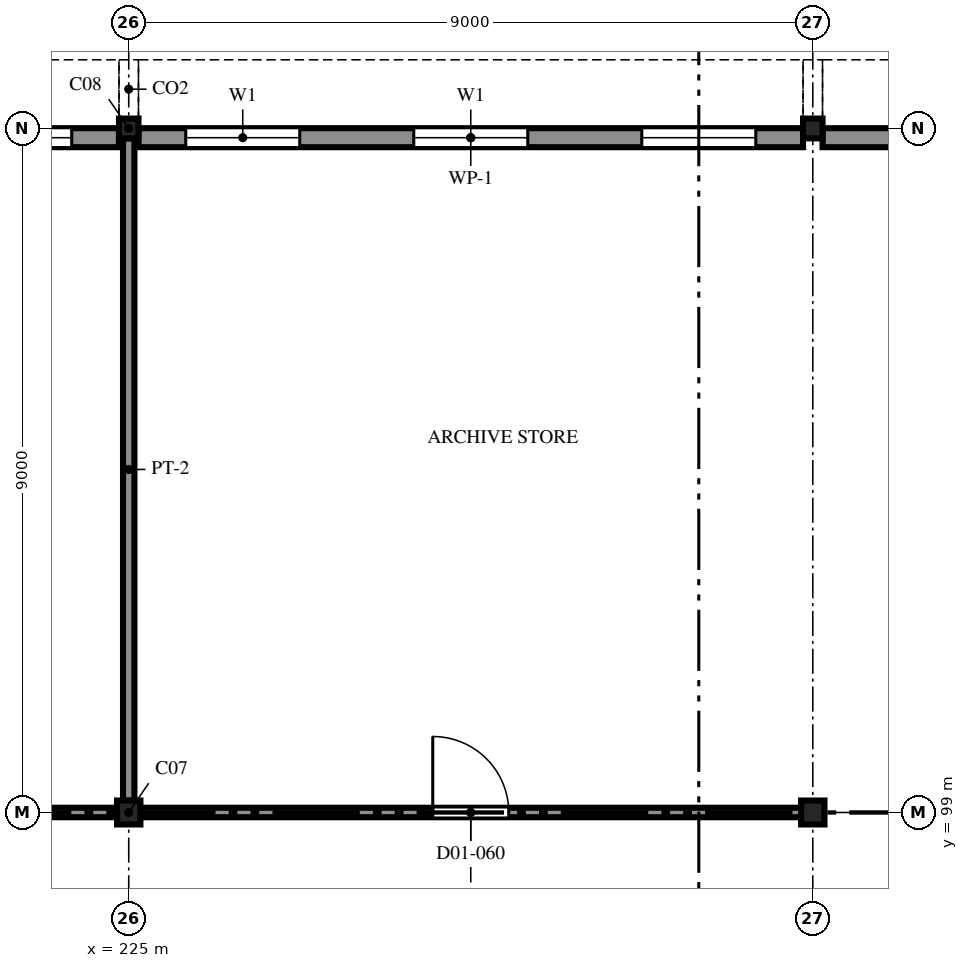
"""IFC4 building model, lengths in metres.
Left out: names, types, materials, properties, quantities, classifications, styles, units other than length and angle.
Written with IfcOpenShell. Run it as: python <this file> out.ifc"""

import sys

from ifc_helpers import new_model, si_unit, direction, frame, frame_2d, origin, origin_2d, place, context, subcontext, project, spatial, polyline, rectangle, i_section, outline, extrude, element, fill, save


model = new_model("IFC4")
c1 = context("Model", 3, precision=1e-05, world=origin(), true_north=direction((0.0, 1.0)))
c2 = subcontext(c1, "Body", "Model", "MODEL_VIEW")
j1 = project(units=[si_unit("LENGTHUNIT", "METRE"), si_unit("PLANEANGLEUNIT", "RADIAN")], contexts=[c1])
p1 = place(None, origin())
s1 = spatial("IfcSite", under=j1, at=p1, CompositionType="ELEMENT")
p2 = place(p1, origin())
s2 = spatial("IfcBuilding", under=s1, at=p2, CompositionType="ELEMENT")
p3 = place(p2, frame((0.0, 0.0, 7.5)))
s3 = spatial("IfcBuildingStorey", under=s2, at=p3, CompositionType="ELEMENT", Elevation=7.5)
p4 = place(p3, frame((225.0, 99.0, 0.0), z_axis=(0.0, 0.0, 1.0), x_axis=(1.0, 0.0, 0.0)))
e1 = element("IfcColumn", 1, at=p4, inside=s3, PredefinedType="COLUMN", context=c2, shape_type="SweptSolid", body=[
    extrude(i_section(OverallWidth=0.307, OverallDepth=0.314, WebThickness=0.012, FlangeThickness=0.019, FilletRadius=0.015, at=origin_2d()), origin(), (0.0, 0.0, 1.0), 4.2),
])
p5 = place(p3, frame((225.0, 108.0, 0.0), z_axis=(0.0, 0.0, 1.0), x_axis=(1.0, 0.0, 0.0)))
e2 = element("IfcColumn", 2, at=p5, inside=s3, PredefinedType="COLUMN", context=c2, shape_type="SweptSolid", body=[
    extrude(i_section(OverallWidth=0.256, OverallDepth=0.26, WebThickness=0.01, FlangeThickness=0.017, FilletRadius=0.013, at=origin_2d()), origin(), (0.0, 0.0, 1.0), 4.2),
])
p6 = place(p3, frame((234.0, 99.0, 0.0), z_axis=(0.0, 0.0, 1.0), x_axis=(1.0, 0.0, 0.0)))
e3 = element("IfcColumn", 3, at=p6, inside=s3, PredefinedType="COLUMN", context=c2, shape_type="SweptSolid", body=[
    extrude(i_section(OverallWidth=0.307, OverallDepth=0.314, WebThickness=0.012, FlangeThickness=0.019, FilletRadius=0.015, at=origin_2d()), origin(), (0.0, 0.0, 1.0), 4.2),
])
p7 = place(p3, frame((234.0, 108.0, 0.0), z_axis=(0.0, 0.0, 1.0), x_axis=(1.0, 0.0, 0.0)))
e4 = element("IfcColumn", 4, at=p7, inside=s3, PredefinedType="COLUMN", context=c2, shape_type="SweptSolid", body=[
    extrude(i_section(OverallWidth=0.256, OverallDepth=0.26, WebThickness=0.01, FlangeThickness=0.017, FilletRadius=0.013, at=origin_2d()), origin(), (0.0, 0.0, 1.0), 4.2),
])
p8 = place(p3, frame((216.128, 107.878, 0.0), z_axis=(0.0, 0.0, 1.0), x_axis=(1.0, 0.0, 0.0)))
e5 = element("IfcWall", 5, at=p8, inside=s3, PredefinedType="SOLIDWALL", context=c2, shape_type="SweptSolid", body=[
    extrude(rectangle(XDim=8.744, YDim=0.25, at=frame_2d((4.372, 0.0))), origin(), (0.0, 0.0, 1.0), 4.05),
])
p9 = place(p8, frame((0.622, 0.0, 0.9)))
e6 = element("IfcOpeningElement", 6, at=p9, cuts=e5, PredefinedType="OPENING", context=c2, shape_type="SweptSolid", body=[
    extrude(rectangle(XDim=1.5, YDim=2.4, at=frame_2d((0.75, 1.2))), frame((0.0, 0.135, 0.0), z_axis=(0.0, -1.0, 0.0), x_axis=(1.0, 0.0, 0.0)), (0.0, 0.0, 1.0), 0.27),
])
p10 = place(p8, frame((3.622, 0.0, 0.9)))
e7 = element("IfcOpeningElement", 7, at=p10, cuts=e5, PredefinedType="OPENING", context=c2, shape_type="SweptSolid", body=[
    extrude(rectangle(XDim=1.5, YDim=2.4, at=frame_2d((0.75, 1.2))), frame((0.0, 0.135, 0.0), z_axis=(0.0, -1.0, 0.0), x_axis=(1.0, 0.0, 0.0)), (0.0, 0.0, 1.0), 0.27),
])
p11 = place(p8, frame((6.622, 0.0, 0.9)))
e8 = element("IfcOpeningElement", 8, at=p11, cuts=e5, PredefinedType="OPENING", context=c2, shape_type="SweptSolid", body=[
    extrude(rectangle(XDim=1.5, YDim=2.4, at=frame_2d((0.75, 1.2))), frame((0.0, 0.135, 0.0), z_axis=(0.0, -1.0, 0.0), x_axis=(1.0, 0.0, 0.0)), (0.0, 0.0, 1.0), 0.27),
])
p12 = place(p3, frame((225.128, 107.878, 0.0), z_axis=(0.0, 0.0, 1.0), x_axis=(1.0, 0.0, 0.0)))
e9 = element("IfcWall", 9, at=p12, inside=s3, PredefinedType="SOLIDWALL", context=c2, shape_type="SweptSolid", body=[
    extrude(rectangle(XDim=8.744, YDim=0.25, at=frame_2d((4.372, 0.0))), origin(), (0.0, 0.0, 1.0), 4.05),
])
p13 = place(p12, frame((0.622, 0.0, 0.9)))
e10 = element("IfcOpeningElement", 10, at=p13, cuts=e9, PredefinedType="OPENING", context=c2, shape_type="SweptSolid", body=[
    extrude(rectangle(XDim=1.5, YDim=2.4, at=frame_2d((0.75, 1.2))), frame((0.0, 0.135, 0.0), z_axis=(0.0, -1.0, 0.0), x_axis=(1.0, 0.0, 0.0)), (0.0, 0.0, 1.0), 0.27),
])
p14 = place(p12, frame((3.622, 0.0, 0.9)))
e11 = element("IfcOpeningElement", 11, at=p14, cuts=e9, PredefinedType="OPENING", context=c2, shape_type="SweptSolid", body=[
    extrude(rectangle(XDim=1.5, YDim=2.4, at=frame_2d((0.75, 1.2))), frame((0.0, 0.135, 0.0), z_axis=(0.0, -1.0, 0.0), x_axis=(1.0, 0.0, 0.0)), (0.0, 0.0, 1.0), 0.27),
])
p15 = place(p12, frame((6.622, 0.0, 0.9)))
e12 = element("IfcOpeningElement", 12, at=p15, cuts=e9, PredefinedType="OPENING", context=c2, shape_type="SweptSolid", body=[
    extrude(rectangle(XDim=1.5, YDim=2.4, at=frame_2d((0.75, 1.2))), frame((0.0, 0.135, 0.0), z_axis=(0.0, -1.0, 0.0), x_axis=(1.0, 0.0, 0.0)), (0.0, 0.0, 1.0), 0.27),
])
p16 = place(p3, frame((234.128, 107.878, 0.0), z_axis=(0.0, 0.0, 1.0), x_axis=(1.0, 0.0, 0.0)))
e13 = element("IfcWall", 13, at=p16, inside=s3, PredefinedType="SOLIDWALL", context=c2, shape_type="SweptSolid", body=[
    extrude(rectangle(XDim=8.744, YDim=0.25, at=frame_2d((4.372, 0.0))), origin(), (0.0, 0.0, 1.0), 4.05),
])
p17 = place(p16, frame((3.922, 0.0, 1.2)))
e14 = element("IfcOpeningElement", 14, at=p17, cuts=e13, PredefinedType="OPENING", context=c2, shape_type="SweptSolid", body=[
    extrude(rectangle(XDim=0.9, YDim=1.8, at=frame_2d((0.45, 0.9))), frame((0.0, 0.135, 0.0), z_axis=(0.0, -1.0, 0.0), x_axis=(1.0, 0.0, 0.0)), (0.0, 0.0, 1.0), 0.27),
])
p18 = place(p3, frame((216.154, 99.0, 0.0), z_axis=(0.0, 0.0, 1.0), x_axis=(1.0, 0.0, 0.0)))
e15 = element("IfcWall", 15, at=p18, inside=s3, PredefinedType="PARTITIONING", context=c2, shape_type="SweptSolid", body=[
    extrude(rectangle(XDim=8.692, YDim=0.125, at=frame_2d((4.346, 0.0))), origin(), (0.0, 0.0, 1.0), 3.307),
])
p19 = place(p3, frame((225.154, 99.0, 0.0), z_axis=(0.0, 0.0, 1.0), x_axis=(1.0, 0.0, 0.0)))
e16 = element("IfcWall", 16, at=p19, inside=s3, PredefinedType="PARTITIONING", context=c2, shape_type="SweptSolid", body=[
    extrude(rectangle(XDim=8.692, YDim=0.125, at=frame_2d((4.346, 0.0))), origin(), (0.0, 0.0, 1.0), 3.307),
])
p20 = place(p19, frame((3.846, 0.0, 0.0)))
e17 = element("IfcOpeningElement", 17, at=p20, cuts=e16, PredefinedType="OPENING", context=c2, shape_type="SweptSolid", body=[
    extrude(rectangle(XDim=1.0, YDim=2.1, at=frame_2d((0.5, 1.05))), frame((0.0, 0.073, 0.0), z_axis=(0.0, -1.0, 0.0), x_axis=(1.0, 0.0, 0.0)), (0.0, 0.0, 1.0), 0.145),
])
p21 = place(p3, frame((225.0, 107.87, 0.0), z_axis=(0.0, 0.0, 1.0), x_axis=(0.0, -1.0, 0.0)))
e18 = element("IfcWall", 18, at=p21, inside=s3, PredefinedType="PARTITIONING", context=c2, shape_type="SweptSolid", body=[
    extrude(rectangle(XDim=8.713, YDim=0.15, at=frame_2d((4.356, 0.0))), origin(), (0.0, 0.0, 1.0), 3.307),
])
p22 = place(p11, origin())
e19 = element("IfcWindow", 19, at=p22, inside=s3, PartitioningType="DOUBLE_PANEL_VERTICAL", PredefinedType="WINDOW", context=c2, shape_type="SweptSolid", body=[
    extrude(outline(polyline([(0.0, 0.0), (1.5, 0.0), (1.5, 2.4), (0.0, 2.4), (0.0, 0.0)]), holes=[polyline([(0.07, 0.07), (1.43, 0.07), (1.43, 2.33), (0.07, 2.33), (0.07, 0.07)])]), frame((0.0, 0.03, 0.0), z_axis=(0.0, -1.0, 0.0), x_axis=(1.0, 0.0, 0.0)), (0.0, 0.0, 1.0), 0.06),
    extrude(rectangle(XDim=0.04, YDim=2.26, at=frame_2d((0.75, 1.2))), frame((0.0, 0.022, 0.0), z_axis=(0.0, -1.0, 0.0), x_axis=(1.0, 0.0, 0.0)), (0.0, 0.0, 1.0), 0.044),
    extrude(outline(polyline([(0.07, 0.07), (0.73, 0.07), (0.73, 2.33), (0.07, 2.33), (0.07, 0.07)]), holes=[polyline([(0.1, 0.1), (0.7, 0.1), (0.7, 2.3), (0.1, 2.3), (0.1, 0.1)])]), frame((0.0, 0.022, 0.0), z_axis=(0.0, -1.0, 0.0), x_axis=(1.0, 0.0, 0.0)), (0.0, 0.0, 1.0), 0.045),
    extrude(rectangle(XDim=0.6, YDim=2.2, at=frame_2d((0.4, 1.2))), frame((0.0, 0.006, 0.0), z_axis=(0.0, -1.0, 0.0), x_axis=(1.0, 0.0, 0.0)), (0.0, 0.0, 1.0), 0.012),
    extrude(outline(polyline([(0.77, 0.07), (1.43, 0.07), (1.43, 2.33), (0.77, 2.33), (0.77, 0.07)]), holes=[polyline([(0.8, 0.1), (1.4, 0.1), (1.4, 2.3), (0.8, 2.3), (0.8, 0.1)])]), frame((0.0, 0.022, 0.0), z_axis=(0.0, -1.0, 0.0), x_axis=(1.0, 0.0, 0.0)), (0.0, 0.0, 1.0), 0.045),
    extrude(rectangle(XDim=0.6, YDim=2.2, at=frame_2d((1.1, 1.2))), frame((0.0, 0.006, 0.0), z_axis=(0.0, -1.0, 0.0), x_axis=(1.0, 0.0, 0.0)), (0.0, 0.0, 1.0), 0.012),
])
fill(e8, e19)
p23 = place(p13, origin())
e20 = element("IfcWindow", 20, at=p23, inside=s3, PartitioningType="DOUBLE_PANEL_VERTICAL", PredefinedType="WINDOW", context=c2, shape_type="SweptSolid", body=[
    extrude(outline(polyline([(0.0, 0.0), (1.5, 0.0), (1.5, 2.4), (0.0, 2.4), (0.0, 0.0)]), holes=[polyline([(0.07, 0.07), (1.43, 0.07), (1.43, 2.33), (0.07, 2.33), (0.07, 0.07)])]), frame((0.0, 0.03, 0.0), z_axis=(0.0, -1.0, 0.0), x_axis=(1.0, 0.0, 0.0)), (0.0, 0.0, 1.0), 0.06),
    extrude(rectangle(XDim=0.04, YDim=2.26, at=frame_2d((0.75, 1.2))), frame((0.0, 0.022, 0.0), z_axis=(0.0, -1.0, 0.0), x_axis=(1.0, 0.0, 0.0)), (0.0, 0.0, 1.0), 0.044),
    extrude(outline(polyline([(0.07, 0.07), (0.73, 0.07), (0.73, 2.33), (0.07, 2.33), (0.07, 0.07)]), holes=[polyline([(0.1, 0.1), (0.7, 0.1), (0.7, 2.3), (0.1, 2.3), (0.1, 0.1)])]), frame((0.0, 0.022, 0.0), z_axis=(0.0, -1.0, 0.0), x_axis=(1.0, 0.0, 0.0)), (0.0, 0.0, 1.0), 0.045),
    extrude(rectangle(XDim=0.6, YDim=2.2, at=frame_2d((0.4, 1.2))), frame((0.0, 0.006, 0.0), z_axis=(0.0, -1.0, 0.0), x_axis=(1.0, 0.0, 0.0)), (0.0, 0.0, 1.0), 0.012),
    extrude(outline(polyline([(0.77, 0.07), (1.43, 0.07), (1.43, 2.33), (0.77, 2.33), (0.77, 0.07)]), holes=[polyline([(0.8, 0.1), (1.4, 0.1), (1.4, 2.3), (0.8, 2.3), (0.8, 0.1)])]), frame((0.0, 0.022, 0.0), z_axis=(0.0, -1.0, 0.0), x_axis=(1.0, 0.0, 0.0)), (0.0, 0.0, 1.0), 0.045),
    extrude(rectangle(XDim=0.6, YDim=2.2, at=frame_2d((1.1, 1.2))), frame((0.0, 0.006, 0.0), z_axis=(0.0, -1.0, 0.0), x_axis=(1.0, 0.0, 0.0)), (0.0, 0.0, 1.0), 0.012),
])
fill(e10, e20)
p24 = place(p14, origin())
e21 = element("IfcWindow", 21, at=p24, inside=s3, PartitioningType="DOUBLE_PANEL_VERTICAL", PredefinedType="WINDOW", context=c2, shape_type="SweptSolid", body=[
    extrude(outline(polyline([(0.0, 0.0), (1.5, 0.0), (1.5, 2.4), (0.0, 2.4), (0.0, 0.0)]), holes=[polyline([(0.07, 0.07), (1.43, 0.07), (1.43, 2.33), (0.07, 2.33), (0.07, 0.07)])]), frame((0.0, 0.03, 0.0), z_axis=(0.0, -1.0, 0.0), x_axis=(1.0, 0.0, 0.0)), (0.0, 0.0, 1.0), 0.06),
    extrude(rectangle(XDim=0.04, YDim=2.26, at=frame_2d((0.75, 1.2))), frame((0.0, 0.022, 0.0), z_axis=(0.0, -1.0, 0.0), x_axis=(1.0, 0.0, 0.0)), (0.0, 0.0, 1.0), 0.044),
    extrude(outline(polyline([(0.07, 0.07), (0.73, 0.07), (0.73, 2.33), (0.07, 2.33), (0.07, 0.07)]), holes=[polyline([(0.1, 0.1), (0.7, 0.1), (0.7, 2.3), (0.1, 2.3), (0.1, 0.1)])]), frame((0.0, 0.022, 0.0), z_axis=(0.0, -1.0, 0.0), x_axis=(1.0, 0.0, 0.0)), (0.0, 0.0, 1.0), 0.045),
    extrude(rectangle(XDim=0.6, YDim=2.2, at=frame_2d((0.4, 1.2))), frame((0.0, 0.006, 0.0), z_axis=(0.0, -1.0, 0.0), x_axis=(1.0, 0.0, 0.0)), (0.0, 0.0, 1.0), 0.012),
    extrude(outline(polyline([(0.77, 0.07), (1.43, 0.07), (1.43, 2.33), (0.77, 2.33), (0.77, 0.07)]), holes=[polyline([(0.8, 0.1), (1.4, 0.1), (1.4, 2.3), (0.8, 2.3), (0.8, 0.1)])]), frame((0.0, 0.022, 0.0), z_axis=(0.0, -1.0, 0.0), x_axis=(1.0, 0.0, 0.0)), (0.0, 0.0, 1.0), 0.045),
    extrude(rectangle(XDim=0.6, YDim=2.2, at=frame_2d((1.1, 1.2))), frame((0.0, 0.006, 0.0), z_axis=(0.0, -1.0, 0.0), x_axis=(1.0, 0.0, 0.0)), (0.0, 0.0, 1.0), 0.012),
])
fill(e11, e21)
p25 = place(p15, origin())
e22 = element("IfcWindow", 22, at=p25, inside=s3, PartitioningType="DOUBLE_PANEL_VERTICAL", PredefinedType="WINDOW", context=c2, shape_type="SweptSolid", body=[
    extrude(outline(polyline([(0.0, 0.0), (1.5, 0.0), (1.5, 2.4), (0.0, 2.4), (0.0, 0.0)]), holes=[polyline([(0.07, 0.07), (1.43, 0.07), (1.43, 2.33), (0.07, 2.33), (0.07, 0.07)])]), frame((0.0, 0.03, 0.0), z_axis=(0.0, -1.0, 0.0), x_axis=(1.0, 0.0, 0.0)), (0.0, 0.0, 1.0), 0.06),
    extrude(rectangle(XDim=0.04, YDim=2.26, at=frame_2d((0.75, 1.2))), frame((0.0, 0.022, 0.0), z_axis=(0.0, -1.0, 0.0), x_axis=(1.0, 0.0, 0.0)), (0.0, 0.0, 1.0), 0.044),
    extrude(outline(polyline([(0.07, 0.07), (0.73, 0.07), (0.73, 2.33), (0.07, 2.33), (0.07, 0.07)]), holes=[polyline([(0.1, 0.1), (0.7, 0.1), (0.7, 2.3), (0.1, 2.3), (0.1, 0.1)])]), frame((0.0, 0.022, 0.0), z_axis=(0.0, -1.0, 0.0), x_axis=(1.0, 0.0, 0.0)), (0.0, 0.0, 1.0), 0.045),
    extrude(rectangle(XDim=0.6, YDim=2.2, at=frame_2d((0.4, 1.2))), frame((0.0, 0.006, 0.0), z_axis=(0.0, -1.0, 0.0), x_axis=(1.0, 0.0, 0.0)), (0.0, 0.0, 1.0), 0.012),
    extrude(outline(polyline([(0.77, 0.07), (1.43, 0.07), (1.43, 2.33), (0.77, 2.33), (0.77, 0.07)]), holes=[polyline([(0.8, 0.1), (1.4, 0.1), (1.4, 2.3), (0.8, 2.3), (0.8, 0.1)])]), frame((0.0, 0.022, 0.0), z_axis=(0.0, -1.0, 0.0), x_axis=(1.0, 0.0, 0.0)), (0.0, 0.0, 1.0), 0.045),
    extrude(rectangle(XDim=0.6, YDim=2.2, at=frame_2d((1.1, 1.2))), frame((0.0, 0.006, 0.0), z_axis=(0.0, -1.0, 0.0), x_axis=(1.0, 0.0, 0.0)), (0.0, 0.0, 1.0), 0.012),
])
fill(e12, e22)
p26 = place(p20, origin())
e23 = element("IfcDoor", 23, at=p26, inside=s3, OperationType="SINGLE_SWING_LEFT", PredefinedType="DOOR", context=c2, shape_type="SweptSolid", body=[
    extrude(outline(polyline([(0.0, 0.0), (0.07, 0.0), (0.07, 2.03), (0.93, 2.03), (0.93, 0.0), (1.0, 0.0), (1.0, 2.1), (0.0, 2.1), (0.0, 0.0)])), frame((0.0, 0.025, 0.0), z_axis=(0.0, -1.0, 0.0), x_axis=(1.0, 0.0, 0.0)), (0.0, 0.0, 1.0), 0.05),
    extrude(outline(polyline([(0.074, 0.01), (0.926, 0.01), (0.926, 2.026), (0.074, 2.026), (0.074, 0.01)]), holes=[polyline([(0.194, 0.16), (0.806, 0.16), (0.806, 1.01), (0.194, 1.01), (0.194, 0.16)]), polyline([(0.35, 1.16), (0.65, 1.16), (0.65, 1.76), (0.35, 1.76), (0.35, 1.16)])]), frame((0.0, 0.017, 0.0), z_axis=(0.0, -1.0, 0.0), x_axis=(1.0, 0.0, 0.0)), (0.0, 0.0, 1.0), 0.035),
    extrude(rectangle(XDim=0.612, YDim=0.85, at=frame_2d((0.5, 0.585))), frame((0.0, 0.009, 0.0), z_axis=(0.0, -1.0, 0.0), x_axis=(1.0, 0.0, 0.0)), (0.0, 0.0, 1.0), 0.017),
    extrude(rectangle(XDim=0.3, YDim=0.6, at=frame_2d((0.5, 1.46))), frame((0.0, 0.006, 0.0), z_axis=(0.0, -1.0, 0.0), x_axis=(1.0, 0.0, 0.0)), (0.0, 0.0, 1.0), 0.012),
])
fill(e17, e23)
save(model, sys.argv[1])
